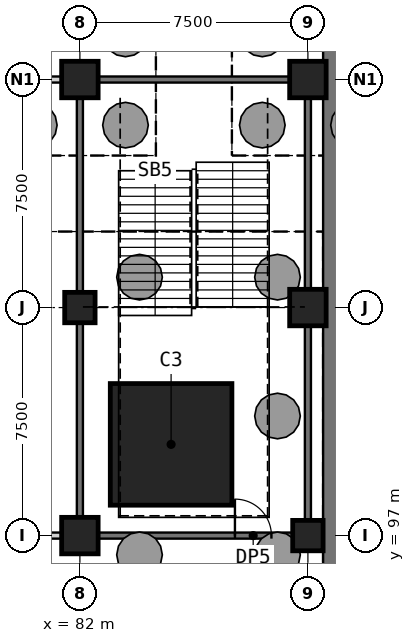
"""IFC4 building model, lengths in metres.
Left out: names, types, materials, properties, quantities, classifications, styles, units other than length and angle.
Written with IfcOpenShell. Run it as: python <this file> out.ifc"""

import sys

from ifc_helpers import new_model, si_unit, direction, frame, frame_2d, origin, origin_2d, place, context, subcontext, project, spatial, rectangle, extrude, element, fill, save


model = new_model("IFC4")
c1 = context("Model", 3, precision=1e-05, world=origin(), true_north=direction((0.0, 1.0)))
c2 = subcontext(c1, "Body", "Model", "MODEL_VIEW")
j1 = project(units=[si_unit("LENGTHUNIT", "METRE"), si_unit("PLANEANGLEUNIT", "RADIAN")], contexts=[c1])
p1 = place(None, origin())
s1 = spatial("IfcSite", under=j1, at=p1, CompositionType="ELEMENT")
p2 = place(p1, origin())
s2 = spatial("IfcBuilding", under=s1, at=p2, CompositionType="ELEMENT")
p3 = place(p2, frame((0.0, 0.0, -12.0)))
s3 = spatial("IfcBuildingStorey", under=s2, at=p3, CompositionType="ELEMENT", Elevation=-12.0)
p4 = place(p3, frame((90.5, 25.0, 0.0), z_axis=(0.0, 0.0, 1.0), x_axis=(0.0, 1.0, 0.0)))
e1 = element("IfcWall", 1, at=p4, inside=s3, PredefinedType="SHEAR", context=c2, shape_type="SweptSolid", body=[
    extrude(rectangle(XDim=92.5, YDim=1.0, at=frame_2d((46.25, 0.0))), origin(), (0.0, 0.0, 1.0), 5.4),
])
p5 = place(p4, frame((23.15, 0.0, 0.0)))
e2 = element("IfcOpeningElement", 2, at=p5, cuts=e1, PredefinedType="OPENING", context=c2, shape_type="SweptSolid", body=[
    extrude(rectangle(XDim=1.5, YDim=2.1, at=frame_2d((0.75, 1.05))), frame((0.0, 0.51, 0.0), z_axis=(0.0, -1.0, 0.0), x_axis=(1.0, 0.0, 0.0)), (0.0, 0.0, 1.0), 1.02),
])
p6 = place(p4, frame((67.75, 0.0, 0.0)))
e3 = element("IfcOpeningElement", 3, at=p6, cuts=e1, PredefinedType="OPENING", context=c2, shape_type="SweptSolid", body=[
    extrude(rectangle(XDim=1.5, YDim=2.1, at=frame_2d((0.75, 1.05))), frame((0.0, 0.51, 0.0), z_axis=(0.0, -1.0, 0.0), x_axis=(1.0, 0.0, 0.0)), (0.0, 0.0, 1.0), 1.02),
])
p7 = place(p3, frame((82.0, 97.0, 0.0), z_axis=(0.0, 0.0, 1.0), x_axis=(1.0, 0.0, 0.0)))
e4 = element("IfcColumn", 4, at=p7, inside=s3, PredefinedType="COLUMN", context=c2, shape_type="SweptSolid", body=[
    extrude(rectangle(XDim=1.2, YDim=1.2, at=origin_2d()), origin(), (0.0, 0.0, 1.0), 6.0),
])
for number, where, z_axis, x_axis in (
    (5, (82.0, 104.5, 0.0), (0.0, 0.0, 1.0), (1.0, 0.0, 0.0)),
    (6, (89.5, 97.0, 0.0), (0.0, 0.0, 1.0), (1.0, 0.0, 0.0)),
):
    element("IfcColumn", number, at=place(p3, frame(where, z_axis=z_axis, x_axis=x_axis)), inside=s3, PredefinedType="COLUMN", context=c2, shape_type="SweptSolid", body=[
        extrude(rectangle(XDim=1.0, YDim=1.0, at=origin_2d()), origin(), (0.0, 0.0, 1.0), 6.0),
    ])
p8 = place(p3, frame((85.0, 100.0, 0.0), z_axis=(0.0, 0.0, 1.0), x_axis=(1.0, 0.0, 0.0)))
e7 = element("IfcColumn", 7, at=p8, inside=s3, PredefinedType="COLUMN", context=c2, shape_type="SweptSolid", body=[
    extrude(rectangle(XDim=4.0, YDim=4.0, at=origin_2d()), origin(), (0.0, 0.0, 1.0), 6.0),
])
for number, where, z_axis, x_axis in (
    (8, (82.0, 112.0, 0.0), (0.0, 0.0, 1.0), (1.0, 0.0, 0.0)),
    (9, (89.5, 104.5, 0.0), (0.0, 0.0, 1.0), (1.0, 0.0, 0.0)),
    (10, (89.5, 112.0, 0.0), (0.0, 0.0, 1.0), (1.0, 0.0, 0.0)),
):
    element("IfcColumn", number, at=place(p3, frame(where, z_axis=z_axis, x_axis=x_axis)), inside=s3, PredefinedType="COLUMN", context=c2, shape_type="SweptSolid", body=[
        extrude(rectangle(XDim=1.2, YDim=1.2, at=origin_2d()), origin(), (0.0, 0.0, 1.0), 6.0),
    ])
p9 = place(p3, frame((81.4, 97.0, 0.0), z_axis=(0.0, 0.0, 1.0), x_axis=(-1.0, 0.0, 0.0)))
e11 = element("IfcWall", 11, at=p9, inside=s3, PredefinedType="PARTITIONING", context=c2, shape_type="SweptSolid", body=[
    extrude(rectangle(XDim=6.3, YDim=0.2, at=frame_2d((3.15, 0.0))), origin(), (0.0, 0.0, 1.0), 5.4),
])
p10 = place(p9, frame((2.55, 0.0, 0.0)))
e12 = element("IfcOpeningElement", 12, at=p10, cuts=e11, PredefinedType="OPENING", context=c2, shape_type="SweptSolid", body=[
    extrude(rectangle(XDim=1.0, YDim=2.1, at=frame_2d((0.5, 1.05))), frame((0.0, 0.11, 0.0), z_axis=(0.0, -1.0, 0.0), x_axis=(1.0, 0.0, 0.0)), (0.0, 0.0, 1.0), 0.22),
])
p11 = place(p3, frame((82.6, 97.0, 0.0), z_axis=(0.0, 0.0, 1.0), x_axis=(1.0, 0.0, 0.0)))
e13 = element("IfcWall", 13, at=p11, inside=s3, PredefinedType="SHEAR", context=c2, shape_type="SweptSolid", body=[
    extrude(rectangle(XDim=6.4, YDim=0.2, at=frame_2d((3.2, 0.0))), origin(), (0.0, 0.0, 1.0), 5.4),
])
p12 = place(p11, frame((4.5, 0.0, 0.0)))
e14 = element("IfcOpeningElement", 14, at=p12, cuts=e13, PredefinedType="OPENING", context=c2, shape_type="SweptSolid", body=[
    extrude(rectangle(XDim=1.2, YDim=2.1, at=frame_2d((0.6, 1.05))), frame((0.0, 0.11, 0.0), z_axis=(0.0, -1.0, 0.0), x_axis=(1.0, 0.0, 0.0)), (0.0, 0.0, 1.0), 0.22),
])
p13 = place(p3, frame((75.1, 112.0, 0.0), z_axis=(0.0, 0.0, 1.0), x_axis=(1.0, 0.0, 0.0)))
e15 = element("IfcWall", 15, at=p13, inside=s3, PredefinedType="PARTITIONING", context=c2, shape_type="SweptSolid", body=[
    extrude(rectangle(XDim=6.3, YDim=0.2, at=frame_2d((3.15, 0.0))), origin(), (0.0, 0.0, 1.0), 5.4),
])
p14 = place(p3, frame((82.6, 112.0, 0.0), z_axis=(0.0, 0.0, 1.0), x_axis=(1.0, 0.0, 0.0)))
e16 = element("IfcWall", 16, at=p14, inside=s3, PredefinedType="SHEAR", context=c2, shape_type="SweptSolid", body=[
    extrude(rectangle(XDim=6.3, YDim=0.2, at=frame_2d((3.15, 0.0))), origin(), (0.0, 0.0, 1.0), 5.4),
])
for number, where, z_axis, x_axis in (
    (17, (82.0, 97.6, 0.0), (0.0, 0.0, 1.0), (0.0, 1.0, 0.0)),
    (18, (82.0, 105.0, 0.0), (0.0, 0.0, 1.0), (0.0, 1.0, 0.0)),
    (19, (89.5, 97.5, 0.0), (0.0, 0.0, 1.0), (0.0, 1.0, 0.0)),
):
    element("IfcWall", number, at=place(p3, frame(where, z_axis=z_axis, x_axis=x_axis)), inside=s3, PredefinedType="SHEAR", context=c2, shape_type="SweptSolid", body=[
        extrude(rectangle(XDim=6.4, YDim=0.2, at=frame_2d((3.2, 0.0))), origin(), (0.0, 0.0, 1.0), 5.4),
    ])
p15 = place(p3, frame((89.5, 105.1, 0.0), z_axis=(0.0, 0.0, 1.0), x_axis=(0.0, 1.0, 0.0)))
e20 = element("IfcWall", 20, at=p15, inside=s3, PredefinedType="SHEAR", context=c2, shape_type="SweptSolid", body=[
    extrude(rectangle(XDim=6.3, YDim=0.2, at=frame_2d((3.15, 0.0))), origin(), (0.0, 0.0, 1.0), 5.4),
])
p16 = place(p12, origin())
e21 = element("IfcDoor", 21, at=p16, inside=s3, OperationType="SINGLE_SWING_LEFT", PredefinedType="DOOR", context=c2, shape_type="SweptSolid", body=[
    extrude(rectangle(XDim=1.2, YDim=2.1, at=frame_2d((0.6, 1.05))), frame((0.0, 0.025, 0.0), z_axis=(0.0, -1.0, 0.0), x_axis=(1.0, 0.0, 0.0)), (0.0, 0.0, 1.0), 0.05),
])
fill(e14, e21)
save(model, sys.argv[1])
